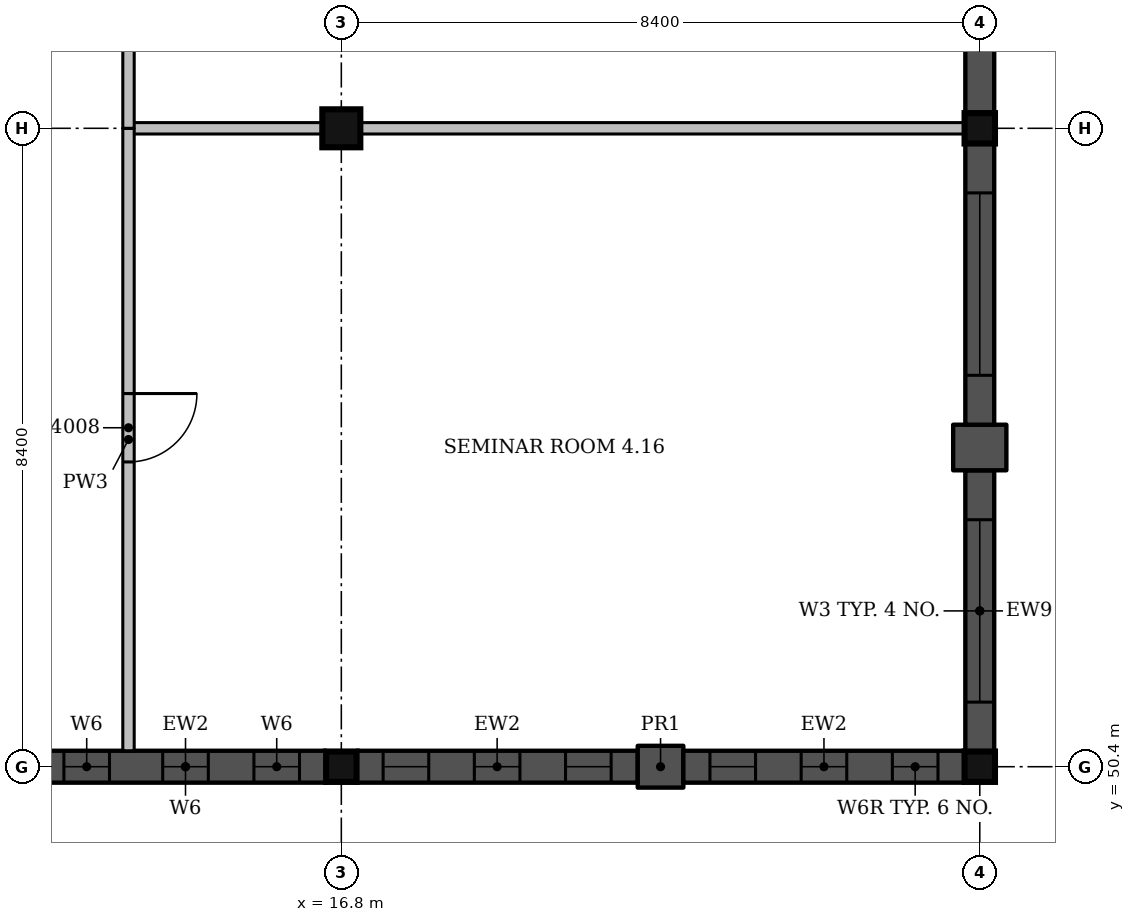
"""IFC4 building model, lengths in metres.
Left out: names, types, materials, properties, quantities, classifications, styles, units other than length and angle.
Written with IfcOpenShell. Run it as: python <this file> out.ifc"""

import sys

from ifc_helpers import new_model, si_unit, direction, frame, frame_2d, origin, origin_2d, place, context, subcontext, project, spatial, rectangle, extrude, element, fill, save


model = new_model("IFC4")
c1 = context("Model", 3, precision=1e-05, world=origin(), true_north=direction((0.0, 1.0)))
c2 = subcontext(c1, "Body", "Model", "MODEL_VIEW")
j1 = project(units=[si_unit("LENGTHUNIT", "METRE"), si_unit("PLANEANGLEUNIT", "RADIAN")], contexts=[c1])
p1 = place(None, origin())
s1 = spatial("IfcSite", under=j1, at=p1, CompositionType="ELEMENT")
p2 = place(p1, origin())
s2 = spatial("IfcBuilding", under=s1, at=p2, CompositionType="ELEMENT")
p3 = place(p2, frame((0.0, 0.0, 18.0)))
s3 = spatial("IfcBuildingStorey", under=s2, at=p3, CompositionType="ELEMENT", Elevation=18.0)
p4 = place(p3, frame((16.8, 50.4, 0.0), z_axis=(0.0, 0.0, 1.0), x_axis=(1.0, 0.0, 0.0)))
e1 = element("IfcColumn", 1, at=p4, inside=s3, PredefinedType="COLUMN", context=c2, shape_type="SweptSolid", body=[
    extrude(rectangle(XDim=0.4, YDim=0.4, at=origin_2d()), origin(), (0.0, 0.0, 1.0), 4.5),
])
p5 = place(p3, frame((16.8, 58.8, 0.0), z_axis=(0.0, 0.0, 1.0), x_axis=(1.0, 0.0, 0.0)))
e2 = element("IfcColumn", 2, at=p5, inside=s3, PredefinedType="COLUMN", context=c2, shape_type="SweptSolid", body=[
    extrude(rectangle(XDim=0.5, YDim=0.5, at=origin_2d()), origin(), (0.0, 0.0, 1.0), 4.5),
])
for number, where, z_axis, x_axis in (
    (3, (25.2, 50.4, 0.0), (0.0, 0.0, 1.0), (1.0, 0.0, 0.0)),
    (4, (25.2, 58.8, 0.0), (0.0, 0.0, 1.0), (1.0, 0.0, 0.0)),
):
    element("IfcColumn", number, at=place(p3, frame(where, z_axis=z_axis, x_axis=x_axis)), inside=s3, PredefinedType="COLUMN", context=c2, shape_type="SweptSolid", body=[
        extrude(rectangle(XDim=0.4, YDim=0.4, at=origin_2d()), origin(), (0.0, 0.0, 1.0), 4.5),
    ])
p6 = place(p3, frame((25.2, 50.6, 0.0), z_axis=(0.0, 0.0, 1.0), x_axis=(0.0, 1.0, 0.0)))
e5 = element("IfcWall", 5, at=p6, inside=s3, PredefinedType="SOLIDWALL", context=c2, shape_type="SweptSolid", body=[
    extrude(rectangle(XDim=3.7, YDim=0.38, at=frame_2d((1.85, 0.0))), origin(), (0.0, 0.0, 1.0), 4.2),
])
p7 = place(p6, frame((0.65, 0.0, 1.2)))
e6 = element("IfcOpeningElement", 6, at=p7, cuts=e5, PredefinedType="OPENING", context=c2, shape_type="SweptSolid", body=[
    extrude(rectangle(XDim=2.4, YDim=1.5, at=frame_2d((1.2, 0.75))), frame((0.0, 0.2, 0.0), z_axis=(0.0, -1.0, 0.0), x_axis=(1.0, 0.0, 0.0)), (0.0, 0.0, 1.0), 0.4),
])
p8 = place(p3, frame((25.2, 54.3, 0.0), z_axis=(0.0, 0.0, 1.0), x_axis=(0.0, 1.0, 0.0)))
e7 = element("IfcWall", 7, at=p8, inside=s3, PredefinedType="SOLIDWALL", context=c2, shape_type="SweptSolid", body=[
    extrude(rectangle(XDim=0.6, YDim=0.7, at=frame_2d((0.3, 0.0))), origin(), (0.0, 0.0, 1.0), 4.2),
])
p9 = place(p3, frame((25.2, 54.9, 0.0), z_axis=(0.0, 0.0, 1.0), x_axis=(0.0, 1.0, 0.0)))
e8 = element("IfcWall", 8, at=p9, inside=s3, PredefinedType="SOLIDWALL", context=c2, shape_type="SweptSolid", body=[
    extrude(rectangle(XDim=3.7, YDim=0.38, at=frame_2d((1.85, 0.0))), origin(), (0.0, 0.0, 1.0), 4.2),
])
p10 = place(p9, frame((0.65, 0.0, 1.2)))
e9 = element("IfcOpeningElement", 9, at=p10, cuts=e8, PredefinedType="OPENING", context=c2, shape_type="SweptSolid", body=[
    extrude(rectangle(XDim=2.4, YDim=1.5, at=frame_2d((1.2, 0.75))), frame((0.0, 0.2, 0.0), z_axis=(0.0, -1.0, 0.0), x_axis=(1.0, 0.0, 0.0)), (0.0, 0.0, 1.0), 0.4),
])
p11 = place(p3, frame((25.2, 59.0, 0.0), z_axis=(0.0, 0.0, 1.0), x_axis=(0.0, 1.0, 0.0)))
e10 = element("IfcWall", 10, at=p11, inside=s3, PredefinedType="SOLIDWALL", context=c2, shape_type="SweptSolid", body=[
    extrude(rectangle(XDim=2.367, YDim=0.38, at=frame_2d((1.183, 0.0))), origin(), (0.0, 0.0, 1.0), 3.35),
])
p12 = place(p3, frame((12.9, 50.4, 0.0), z_axis=(0.0, 0.0, 1.0), x_axis=(1.0, 0.0, 0.0)))
e11 = element("IfcWall", 11, at=p12, inside=s3, PredefinedType="SOLIDWALL", context=c2, shape_type="SweptSolid", body=[
    extrude(rectangle(XDim=3.7, YDim=0.42, at=frame_2d((1.85, 0.0))), origin(), (0.0, 0.0, 1.0), 4.2),
])
p13 = place(p12, frame((0.25, 0.0, 1.0)))
e12 = element("IfcOpeningElement", 12, at=p13, cuts=e11, PredefinedType="OPENING", context=c2, shape_type="SweptSolid", body=[
    extrude(rectangle(XDim=0.6, YDim=2.1, at=frame_2d((0.3, 1.05))), frame((0.0, 0.22, 0.0), z_axis=(0.0, -1.0, 0.0), x_axis=(1.0, 0.0, 0.0)), (0.0, 0.0, 1.0), 0.44),
])
p14 = place(p12, frame((1.55, 0.0, 1.0)))
e13 = element("IfcOpeningElement", 13, at=p14, cuts=e11, PredefinedType="OPENING", context=c2, shape_type="SweptSolid", body=[
    extrude(rectangle(XDim=0.6, YDim=2.1, at=frame_2d((0.3, 1.05))), frame((0.0, 0.22, 0.0), z_axis=(0.0, -1.0, 0.0), x_axis=(1.0, 0.0, 0.0)), (0.0, 0.0, 1.0), 0.44),
])
p15 = place(p12, frame((2.75, 0.0, 1.0)))
e14 = element("IfcOpeningElement", 14, at=p15, cuts=e11, PredefinedType="OPENING", context=c2, shape_type="SweptSolid", body=[
    extrude(rectangle(XDim=0.6, YDim=2.1, at=frame_2d((0.3, 1.05))), frame((0.0, 0.22, 0.0), z_axis=(0.0, -1.0, 0.0), x_axis=(1.0, 0.0, 0.0)), (0.0, 0.0, 1.0), 0.44),
])
p16 = place(p3, frame((17.0, 50.4, 0.0), z_axis=(0.0, 0.0, 1.0), x_axis=(1.0, 0.0, 0.0)))
e15 = element("IfcWall", 15, at=p16, inside=s3, PredefinedType="SOLIDWALL", context=c2, shape_type="SweptSolid", body=[
    extrude(rectangle(XDim=3.7, YDim=0.42, at=frame_2d((1.85, 0.0))), origin(), (0.0, 0.0, 1.0), 3.35),
])
p17 = place(p16, frame((0.35, 0.0, 1.0)))
e16 = element("IfcOpeningElement", 16, at=p17, cuts=e15, PredefinedType="OPENING", context=c2, shape_type="SweptSolid", body=[
    extrude(rectangle(XDim=0.6, YDim=1.8, at=frame_2d((0.3, 0.9))), frame((0.0, 0.22, 0.0), z_axis=(0.0, -1.0, 0.0), x_axis=(1.0, 0.0, 0.0)), (0.0, 0.0, 1.0), 0.44),
])
p18 = place(p16, frame((1.55, 0.0, 1.0)))
e17 = element("IfcOpeningElement", 17, at=p18, cuts=e15, PredefinedType="OPENING", context=c2, shape_type="SweptSolid", body=[
    extrude(rectangle(XDim=0.6, YDim=1.8, at=frame_2d((0.3, 0.9))), frame((0.0, 0.22, 0.0), z_axis=(0.0, -1.0, 0.0), x_axis=(1.0, 0.0, 0.0)), (0.0, 0.0, 1.0), 0.44),
])
p19 = place(p16, frame((2.75, 0.0, 1.0)))
e18 = element("IfcOpeningElement", 18, at=p19, cuts=e15, PredefinedType="OPENING", context=c2, shape_type="SweptSolid", body=[
    extrude(rectangle(XDim=0.6, YDim=1.8, at=frame_2d((0.3, 0.9))), frame((0.0, 0.22, 0.0), z_axis=(0.0, -1.0, 0.0), x_axis=(1.0, 0.0, 0.0)), (0.0, 0.0, 1.0), 0.44),
])
p20 = place(p3, frame((20.7, 50.4, 0.0), z_axis=(0.0, 0.0, 1.0), x_axis=(1.0, 0.0, 0.0)))
e19 = element("IfcWall", 19, at=p20, inside=s3, PredefinedType="SOLIDWALL", context=c2, shape_type="SweptSolid", body=[
    extrude(rectangle(XDim=0.6, YDim=0.55, at=frame_2d((0.3, 0.0))), origin(), (0.0, 0.0, 1.0), 3.35),
])
p21 = place(p3, frame((21.3, 50.4, 0.0), z_axis=(0.0, 0.0, 1.0), x_axis=(1.0, 0.0, 0.0)))
e20 = element("IfcWall", 20, at=p21, inside=s3, PredefinedType="SOLIDWALL", context=c2, shape_type="SweptSolid", body=[
    extrude(rectangle(XDim=3.7, YDim=0.42, at=frame_2d((1.85, 0.0))), origin(), (0.0, 0.0, 1.0), 3.35),
])
p22 = place(p21, frame((0.35, 0.0, 1.0)))
e21 = element("IfcOpeningElement", 21, at=p22, cuts=e20, PredefinedType="OPENING", context=c2, shape_type="SweptSolid", body=[
    extrude(rectangle(XDim=0.6, YDim=1.8, at=frame_2d((0.3, 0.9))), frame((0.0, 0.22, 0.0), z_axis=(0.0, -1.0, 0.0), x_axis=(1.0, 0.0, 0.0)), (0.0, 0.0, 1.0), 0.44),
])
p23 = place(p21, frame((1.55, 0.0, 1.0)))
e22 = element("IfcOpeningElement", 22, at=p23, cuts=e20, PredefinedType="OPENING", context=c2, shape_type="SweptSolid", body=[
    extrude(rectangle(XDim=0.6, YDim=1.8, at=frame_2d((0.3, 0.9))), frame((0.0, 0.22, 0.0), z_axis=(0.0, -1.0, 0.0), x_axis=(1.0, 0.0, 0.0)), (0.0, 0.0, 1.0), 0.44),
])
p24 = place(p21, frame((2.75, 0.0, 1.0)))
e23 = element("IfcOpeningElement", 23, at=p24, cuts=e20, PredefinedType="OPENING", context=c2, shape_type="SweptSolid", body=[
    extrude(rectangle(XDim=0.6, YDim=1.8, at=frame_2d((0.3, 0.9))), frame((0.0, 0.22, 0.0), z_axis=(0.0, -1.0, 0.0), x_axis=(1.0, 0.0, 0.0)), (0.0, 0.0, 1.0), 0.44),
])
p25 = place(p3, frame((14.0, 58.8, 0.0), z_axis=(0.0, 0.0, 1.0), x_axis=(1.0, 0.0, 0.0)))
e24 = element("IfcWall", 24, at=p25, inside=s3, PredefinedType="PARTITIONING", context=c2, shape_type="SweptSolid", body=[
    extrude(rectangle(XDim=2.55, YDim=0.15, at=frame_2d((1.275, 0.0))), origin(), (0.0, 0.0, 1.0), 3.4),
])
p26 = place(p3, frame((17.05, 58.8, 0.0), z_axis=(0.0, 0.0, 1.0), x_axis=(1.0, 0.0, 0.0)))
e25 = element("IfcWall", 25, at=p26, inside=s3, PredefinedType="PARTITIONING", context=c2, shape_type="SweptSolid", body=[
    extrude(rectangle(XDim=7.95, YDim=0.15, at=frame_2d((3.975, 0.0))), origin(), (0.0, 0.0, 1.0), 3.35),
])
p27 = place(p3, frame((14.0, 50.61, 0.0), z_axis=(0.0, 0.0, 1.0), x_axis=(0.0, 1.0, 0.0)))
e26 = element("IfcWall", 26, at=p27, inside=s3, PredefinedType="PARTITIONING", context=c2, shape_type="SweptSolid", body=[
    extrude(rectangle(XDim=8.19, YDim=0.15, at=frame_2d((4.095, 0.0))), origin(), (0.0, 0.0, 1.0), 3.4),
])
p28 = place(p27, frame((3.8, 0.0, 0.0)))
e27 = element("IfcOpeningElement", 27, at=p28, cuts=e26, PredefinedType="OPENING", context=c2, shape_type="SweptSolid", body=[
    extrude(rectangle(XDim=0.9, YDim=2.1, at=frame_2d((0.45, 1.05))), frame((0.0, 0.085, 0.0), z_axis=(0.0, -1.0, 0.0), x_axis=(1.0, 0.0, 0.0)), (0.0, 0.0, 1.0), 0.17),
])
p29 = place(p3, frame((14.0, 58.8, 0.0), z_axis=(0.0, 0.0, 1.0), x_axis=(0.0, 1.0, 0.0)))
e28 = element("IfcWall", 28, at=p29, inside=s3, PredefinedType="PARTITIONING", context=c2, shape_type="SweptSolid", body=[
    extrude(rectangle(XDim=16.8, YDim=0.15, at=frame_2d((8.4, 0.0))), origin(), (0.0, 0.0, 1.0), 3.4),
])
p30 = place(p29, frame((3.8, 0.0, 0.0)))
e29 = element("IfcOpeningElement", 29, at=p30, cuts=e28, PredefinedType="OPENING", context=c2, shape_type="SweptSolid", body=[
    extrude(rectangle(XDim=1.0, YDim=2.1, at=frame_2d((0.5, 1.05))), frame((0.0, 0.085, 0.0), z_axis=(0.0, -1.0, 0.0), x_axis=(1.0, 0.0, 0.0)), (0.0, 0.0, 1.0), 0.17),
])
p31 = place(p7, origin())
e30 = element("IfcWindow", 30, at=p31, inside=s3, PartitioningType="SINGLE_PANEL", PredefinedType="WINDOW", context=c2, shape_type="SweptSolid", body=[
    extrude(rectangle(XDim=2.4, YDim=1.5, at=frame_2d((1.2, 0.75))), frame((0.0, 0.15, 0.0), z_axis=(0.0, -1.0, 0.0), x_axis=(1.0, 0.0, 0.0)), (0.0, 0.0, 1.0), 0.06),
])
fill(e6, e30)
p32 = place(p10, origin())
e31 = element("IfcWindow", 31, at=p32, inside=s3, PartitioningType="SINGLE_PANEL", PredefinedType="WINDOW", context=c2, shape_type="SweptSolid", body=[
    extrude(rectangle(XDim=2.4, YDim=1.5, at=frame_2d((1.2, 0.75))), frame((0.0, 0.15, 0.0), z_axis=(0.0, -1.0, 0.0), x_axis=(1.0, 0.0, 0.0)), (0.0, 0.0, 1.0), 0.06),
])
fill(e9, e31)
p33 = place(p13, origin())
e32 = element("IfcWindow", 32, at=p33, inside=s3, PartitioningType="SINGLE_PANEL", PredefinedType="WINDOW", context=c2, shape_type="SweptSolid", body=[
    extrude(rectangle(XDim=0.6, YDim=2.1, at=frame_2d((0.3, 1.05))), frame((0.0, 0.15, 0.0), z_axis=(0.0, -1.0, 0.0), x_axis=(1.0, 0.0, 0.0)), (0.0, 0.0, 1.0), 0.06),
])
fill(e12, e32)
p34 = place(p14, origin())
e33 = element("IfcWindow", 33, at=p34, inside=s3, PartitioningType="SINGLE_PANEL", PredefinedType="WINDOW", context=c2, shape_type="SweptSolid", body=[
    extrude(rectangle(XDim=0.6, YDim=2.1, at=frame_2d((0.3, 1.05))), frame((0.0, 0.15, 0.0), z_axis=(0.0, -1.0, 0.0), x_axis=(1.0, 0.0, 0.0)), (0.0, 0.0, 1.0), 0.06),
])
fill(e13, e33)
p35 = place(p15, origin())
e34 = element("IfcWindow", 34, at=p35, inside=s3, PartitioningType="SINGLE_PANEL", PredefinedType="WINDOW", context=c2, shape_type="SweptSolid", body=[
    extrude(rectangle(XDim=0.6, YDim=2.1, at=frame_2d((0.3, 1.05))), frame((0.0, 0.15, 0.0), z_axis=(0.0, -1.0, 0.0), x_axis=(1.0, 0.0, 0.0)), (0.0, 0.0, 1.0), 0.06),
])
fill(e14, e34)
p36 = place(p17, origin())
e35 = element("IfcWindow", 35, at=p36, inside=s3, PartitioningType="SINGLE_PANEL", PredefinedType="WINDOW", context=c2, shape_type="SweptSolid", body=[
    extrude(rectangle(XDim=0.6, YDim=1.8, at=frame_2d((0.3, 0.9))), frame((0.0, 0.15, 0.0), z_axis=(0.0, -1.0, 0.0), x_axis=(1.0, 0.0, 0.0)), (0.0, 0.0, 1.0), 0.06),
])
fill(e16, e35)
p37 = place(p18, origin())
e36 = element("IfcWindow", 36, at=p37, inside=s3, PartitioningType="SINGLE_PANEL", PredefinedType="WINDOW", context=c2, shape_type="SweptSolid", body=[
    extrude(rectangle(XDim=0.6, YDim=1.8, at=frame_2d((0.3, 0.9))), frame((0.0, 0.15, 0.0), z_axis=(0.0, -1.0, 0.0), x_axis=(1.0, 0.0, 0.0)), (0.0, 0.0, 1.0), 0.06),
])
fill(e17, e36)
p38 = place(p19, origin())
e37 = element("IfcWindow", 37, at=p38, inside=s3, PartitioningType="SINGLE_PANEL", PredefinedType="WINDOW", context=c2, shape_type="SweptSolid", body=[
    extrude(rectangle(XDim=0.6, YDim=1.8, at=frame_2d((0.3, 0.9))), frame((0.0, 0.15, 0.0), z_axis=(0.0, -1.0, 0.0), x_axis=(1.0, 0.0, 0.0)), (0.0, 0.0, 1.0), 0.06),
])
fill(e18, e37)
p39 = place(p22, origin())
e38 = element("IfcWindow", 38, at=p39, inside=s3, PartitioningType="SINGLE_PANEL", PredefinedType="WINDOW", context=c2, shape_type="SweptSolid", body=[
    extrude(rectangle(XDim=0.6, YDim=1.8, at=frame_2d((0.3, 0.9))), frame((0.0, 0.15, 0.0), z_axis=(0.0, -1.0, 0.0), x_axis=(1.0, 0.0, 0.0)), (0.0, 0.0, 1.0), 0.06),
])
fill(e21, e38)
p40 = place(p23, origin())
e39 = element("IfcWindow", 39, at=p40, inside=s3, PartitioningType="SINGLE_PANEL", PredefinedType="WINDOW", context=c2, shape_type="SweptSolid", body=[
    extrude(rectangle(XDim=0.6, YDim=1.8, at=frame_2d((0.3, 0.9))), frame((0.0, 0.15, 0.0), z_axis=(0.0, -1.0, 0.0), x_axis=(1.0, 0.0, 0.0)), (0.0, 0.0, 1.0), 0.06),
])
fill(e22, e39)
p41 = place(p24, origin())
e40 = element("IfcWindow", 40, at=p41, inside=s3, PartitioningType="SINGLE_PANEL", PredefinedType="WINDOW", context=c2, shape_type="SweptSolid", body=[
    extrude(rectangle(XDim=0.6, YDim=1.8, at=frame_2d((0.3, 0.9))), frame((0.0, 0.15, 0.0), z_axis=(0.0, -1.0, 0.0), x_axis=(1.0, 0.0, 0.0)), (0.0, 0.0, 1.0), 0.06),
])
fill(e23, e40)
p42 = place(p28, origin())
e41 = element("IfcDoor", 41, at=p42, inside=s3, OperationType="SINGLE_SWING_RIGHT", PredefinedType="DOOR", context=c2, shape_type="SweptSolid", body=[
    extrude(rectangle(XDim=0.9, YDim=2.1, at=frame_2d((0.45, 1.05))), frame((0.0, 0.025, 0.0), z_axis=(0.0, -1.0, 0.0), x_axis=(1.0, 0.0, 0.0)), (0.0, 0.0, 1.0), 0.05),
])
fill(e27, e41)
save(model, sys.argv[1])
